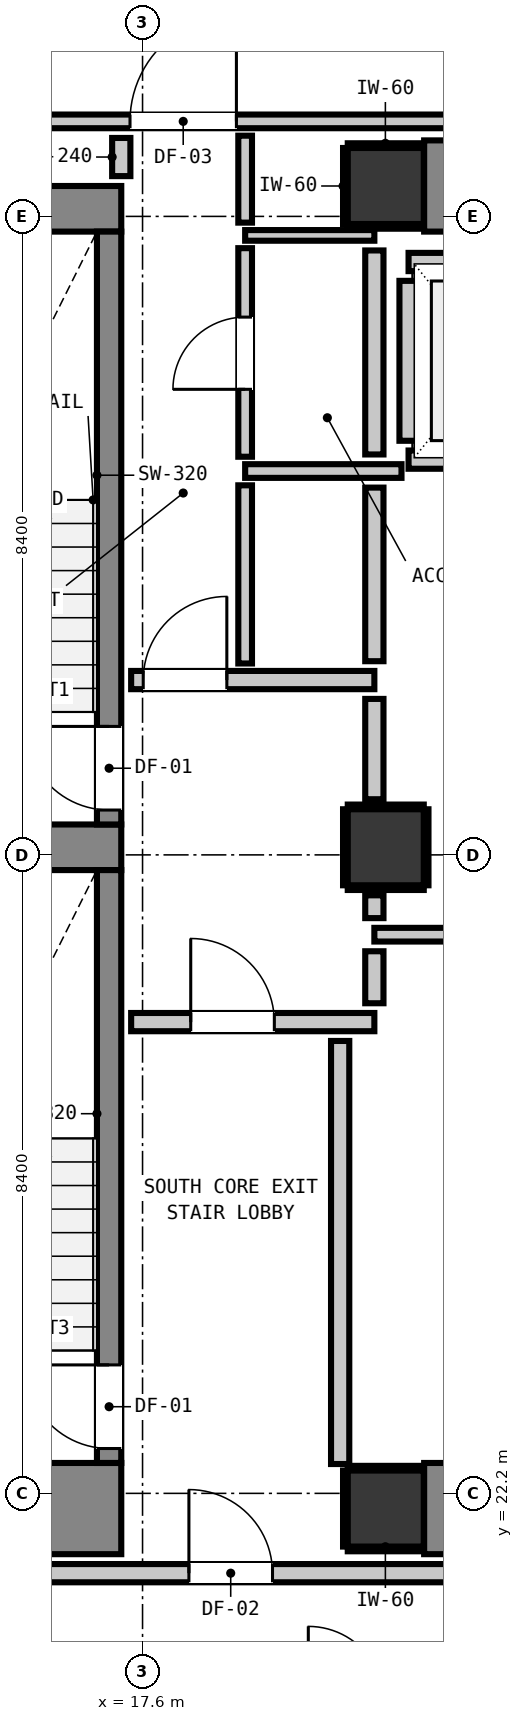
"""IFC4 building model, lengths in metres.
Left out: names, types, materials, properties, quantities, classifications, styles, units other than length and angle.
Written with IfcOpenShell. Run it as: python <this file> out.ifc"""

import sys

from ifc_helpers import new_model, si_unit, direction, frame, frame_2d, origin, origin_2d, place, context, subcontext, project, spatial, rectangle, extrude, element, fill, save


model = new_model("IFC4")
c1 = context("Model", 3, precision=1e-05, world=origin(), true_north=direction((0.0, 1.0)))
c2 = subcontext(c1, "Body", "Model", "MODEL_VIEW")
j1 = project(units=[si_unit("LENGTHUNIT", "METRE"), si_unit("PLANEANGLEUNIT", "RADIAN")], contexts=[c1])
p1 = place(None, origin())
s1 = spatial("IfcSite", under=j1, at=p1, CompositionType="ELEMENT")
p2 = place(p1, origin())
s2 = spatial("IfcBuilding", under=s1, at=p2, CompositionType="ELEMENT")
p3 = place(p2, frame((0.0, 0.0, 81.76)))
s3 = spatial("IfcBuildingStorey", under=s2, at=p3, CompositionType="ELEMENT", Elevation=81.76)
for number, where, z_axis, x_axis in (
    (1, (20.8, 22.0, 0.0), (0.0, 0.0, 1.0), (1.0, 0.0, 0.0)),
    (2, (20.8, 39.4, 0.0), (0.0, 0.0, 1.0), (1.0, 0.0, 0.0)),
):
    element("IfcColumn", number, at=place(p3, frame(where, z_axis=z_axis, x_axis=x_axis)), inside=s3, PredefinedType="COLUMN", context=c2, shape_type="SweptSolid", body=[
        extrude(rectangle(XDim=1.0, YDim=1.0, at=origin_2d()), origin(), (0.0, 0.0, 1.0), 3.32),
    ])
p4 = place(p3, frame((13.24, 22.0, 0.0), z_axis=(0.0, 0.0, 1.0), x_axis=(1.0, 0.0, 0.0)))
e3 = element("IfcWall", 3, at=p4, inside=s3, PredefinedType="SHEAR", context=c2, shape_type="SweptSolid", body=[
    extrude(rectangle(XDim=4.08, YDim=1.2, at=frame_2d((2.04, 0.0))), origin(), (0.0, 0.0, 1.0), 3.32),
])
p5 = place(p3, frame((13.24, 39.1, 0.0), z_axis=(0.0, 0.0, 1.0), x_axis=(1.0, 0.0, 0.0)))
e4 = element("IfcWall", 4, at=p5, inside=s3, PredefinedType="SHEAR", context=c2, shape_type="SweptSolid", body=[
    extrude(rectangle(XDim=4.08, YDim=0.6, at=frame_2d((2.04, 0.0))), origin(), (0.0, 0.0, 1.0), 3.32),
])
p6 = place(p3, frame((13.905, 30.7, 0.0), z_axis=(0.0, 0.0, 1.0), x_axis=(1.0, 0.0, 0.0)))
e5 = element("IfcWall", 5, at=p6, inside=s3, PredefinedType="SHEAR", context=c2, shape_type="SweptSolid", body=[
    extrude(rectangle(XDim=3.415, YDim=0.6, at=frame_2d((1.708, 0.0))), origin(), (0.0, 0.0, 1.0), 3.32),
])
for number, where, z_axis, x_axis in (
    (6, (21.305, 22.0, 0.0), (0.0, 0.0, 1.0), (1.0, 0.0, 0.0)),
    (7, (21.305, 39.4, 0.0), (0.0, 0.0, 1.0), (1.0, 0.0, 0.0)),
):
    element("IfcWall", number, at=place(p3, frame(where, z_axis=z_axis, x_axis=x_axis)), inside=s3, PredefinedType="SHEAR", context=c2, shape_type="SweptSolid", body=[
        extrude(rectangle(XDim=7.39, YDim=1.2, at=frame_2d((3.695, 0.0))), origin(), (0.0, 0.0, 1.0), 3.32),
    ])
p7 = place(p3, frame((17.16, 31.0, 0.0), z_axis=(0.0, 0.0, 1.0), x_axis=(0.0, 1.0, 0.0)))
e8 = element("IfcWall", 8, at=p7, inside=s3, PredefinedType="SHEAR", context=c2, shape_type="SweptSolid", body=[
    extrude(rectangle(XDim=7.8, YDim=0.32, at=frame_2d((3.9, 0.0))), origin(), (0.0, 0.0, 1.0), 3.32),
])
p8 = place(p7, frame((0.19, 0.0, 0.0)))
e9 = element("IfcOpeningElement", 9, at=p8, cuts=e8, PredefinedType="OPENING", context=c2, shape_type="SweptSolid", body=[
    extrude(rectangle(XDim=1.1, YDim=2.15, at=frame_2d((0.55, 1.075))), frame((0.0, 0.17, 0.0), z_axis=(0.0, -1.0, 0.0), x_axis=(1.0, 0.0, 0.0)), (0.0, 0.0, 1.0), 0.34),
])
p9 = place(p3, frame((17.16, 22.6, 0.0), z_axis=(0.0, 0.0, 1.0), x_axis=(0.0, 1.0, 0.0)))
e10 = element("IfcWall", 10, at=p9, inside=s3, PredefinedType="SHEAR", context=c2, shape_type="SweptSolid", body=[
    extrude(rectangle(XDim=7.8, YDim=0.32, at=frame_2d((3.9, 0.0))), origin(), (0.0, 0.0, 1.0), 3.32),
])
p10 = place(p9, frame((0.19, 0.0, 0.0)))
e11 = element("IfcOpeningElement", 11, at=p10, cuts=e10, PredefinedType="OPENING", context=c2, shape_type="SweptSolid", body=[
    extrude(rectangle(XDim=1.1, YDim=2.15, at=frame_2d((0.55, 1.075))), frame((0.0, 0.17, 0.0), z_axis=(0.0, -1.0, 0.0), x_axis=(1.0, 0.0, 0.0)), (0.0, 0.0, 1.0), 0.34),
])
p11 = place(p3, frame((20.8, 30.7, 0.0), z_axis=(0.0, 0.0, 1.0), x_axis=(1.0, 0.0, 0.0)))
e12 = element("IfcColumn", 12, at=p11, inside=s3, PredefinedType="COLUMN", context=c2, shape_type="SweptSolid", body=[
    extrude(rectangle(XDim=1.0, YDim=1.0, at=origin_2d()), origin(), (0.0, 0.0, 1.0), 3.32),
])
for number, where, z_axis, x_axis in (
    (13, (21.1, 35.8, 0.0), (0.0, 0.0, 1.0), (1.0, 0.0, 0.0)),
    (14, (21.1, 38.4, 0.0), (0.0, 0.0, 1.0), (1.0, 0.0, 0.0)),
):
    element("IfcWall", number, at=place(p3, frame(where, z_axis=z_axis, x_axis=x_axis)), inside=s3, PredefinedType="PARTITIONING", context=c2, shape_type="SweptSolid", body=[
        extrude(rectangle(XDim=2.2, YDim=0.24, at=frame_2d((1.1, 0.0))), origin(), (0.0, 0.0, 1.0), 3.06),
    ])
p12 = place(p3, frame((21.1, 36.048, 0.0), z_axis=(0.0, 0.0, 1.0), x_axis=(0.0, 1.0, 0.0)))
e15 = element("IfcWall", 15, at=p12, inside=s3, PredefinedType="PARTITIONING", context=c2, shape_type="SweptSolid", body=[
    extrude(rectangle(XDim=2.104, YDim=0.24, at=frame_2d((1.052, 0.0))), origin(), (0.0, 0.0, 1.0), 2.295),
])
p13 = place(p3, frame((12.993, 21.15, 0.0), z_axis=(0.0, 0.0, 1.0), x_axis=(1.0, 0.0, 0.0)))
e16 = element("IfcWall", 16, at=p13, inside=s3, PredefinedType="PARTITIONING", context=c2, shape_type="SweptSolid", body=[
    extrude(rectangle(XDim=30.98, YDim=0.24, at=frame_2d((15.49, 0.0))), origin(), (0.0, 0.0, 1.0), 3.06),
])
p14 = place(p13, frame((5.217, 0.0, 0.0)))
e17 = element("IfcOpeningElement", 17, at=p14, cuts=e16, PredefinedType="OPENING", context=c2, shape_type="SweptSolid", body=[
    extrude(rectangle(XDim=1.1, YDim=2.15, at=frame_2d((0.55, 1.075))), frame((0.0, 0.13, 0.0), z_axis=(0.0, -1.0, 0.0), x_axis=(1.0, 0.0, 0.0)), (0.0, 0.0, 1.0), 0.26),
])
p15 = place(p13, frame((27.358, 0.0, 0.0)))
e18 = element("IfcOpeningElement", 18, at=p15, cuts=e16, PredefinedType="OPENING", context=c2, shape_type="SweptSolid", body=[
    extrude(rectangle(XDim=1.0, YDim=2.15, at=frame_2d((0.5, 1.075))), frame((0.0, 0.13, 0.0), z_axis=(0.0, -1.0, 0.0), x_axis=(1.0, 0.0, 0.0)), (0.0, 0.0, 1.0), 0.26),
])
p16 = place(p3, frame((17.45, 28.4, 0.0), z_axis=(0.0, 0.0, 1.0), x_axis=(1.0, 0.0, 0.0)))
e19 = element("IfcWall", 19, at=p16, inside=s3, PredefinedType="PARTITIONING", context=c2, shape_type="SweptSolid", body=[
    extrude(rectangle(XDim=3.2, YDim=0.24, at=frame_2d((1.6, 0.0))), origin(), (0.0, 0.0, 1.0), 3.06),
])
p17 = place(p16, frame((0.784, 0.0, 0.0)))
e20 = element("IfcOpeningElement", 20, at=p17, cuts=e19, PredefinedType="OPENING", context=c2, shape_type="SweptSolid", body=[
    extrude(rectangle(XDim=1.1, YDim=2.15, at=frame_2d((0.55, 1.075))), frame((0.0, 0.13, 0.0), z_axis=(0.0, -1.0, 0.0), x_axis=(1.0, 0.0, 0.0)), (0.0, 0.0, 1.0), 0.26),
])
p18 = place(p3, frame((17.45, 32.9, 0.0), z_axis=(0.0, 0.0, 1.0), x_axis=(1.0, 0.0, 0.0)))
e21 = element("IfcWall", 21, at=p18, inside=s3, PredefinedType="PARTITIONING", context=c2, shape_type="SweptSolid", body=[
    extrude(rectangle(XDim=3.2, YDim=0.24, at=frame_2d((1.6, 0.0))), origin(), (0.0, 0.0, 1.0), 3.06),
])
p19 = place(p18, frame((0.159, 0.0, 0.0)))
e22 = element("IfcOpeningElement", 22, at=p19, cuts=e21, PredefinedType="OPENING", context=c2, shape_type="SweptSolid", body=[
    extrude(rectangle(XDim=1.1, YDim=2.15, at=frame_2d((0.55, 1.075))), frame((0.0, 0.13, 0.0), z_axis=(0.0, -1.0, 0.0), x_axis=(1.0, 0.0, 0.0)), (0.0, 0.0, 1.0), 0.26),
])
p20 = place(p3, frame((20.65, 29.55, 0.0), z_axis=(0.0, 0.0, 1.0), x_axis=(1.0, 0.0, 0.0)))
e23 = element("IfcWall", 23, at=p20, inside=s3, PredefinedType="PARTITIONING", context=c2, shape_type="SweptSolid", body=[
    extrude(rectangle(XDim=9.325, YDim=0.18, at=frame_2d((4.663, 0.0))), origin(), (0.0, 0.0, 1.0), 3.06),
])
p21 = place(p3, frame((18.95, 35.65, 0.0), z_axis=(0.0, 0.0, 1.0), x_axis=(1.0, 0.0, 0.0)))
e24 = element("IfcWall", 24, at=p21, inside=s3, PredefinedType="PARTITIONING", context=c2, shape_type="SweptSolid", body=[
    extrude(rectangle(XDim=2.057, YDim=0.18, at=frame_2d((1.029, 0.0))), origin(), (0.0, 0.0, 1.0), 3.06),
])
p22 = place(p3, frame((1.827, 40.25, 0.0), z_axis=(0.0, 0.0, 1.0), x_axis=(1.0, 0.0, 0.0)))
e25 = element("IfcWall", 25, at=p22, inside=s3, PredefinedType="PARTITIONING", context=c2, shape_type="SweptSolid", body=[
    extrude(rectangle(XDim=42.146, YDim=0.18, at=frame_2d((21.073, 0.0))), origin(), (0.0, 0.0, 1.0), 3.06),
])
p23 = place(p22, frame((15.608, 0.0, 0.0)))
e26 = element("IfcOpeningElement", 26, at=p23, cuts=e25, PredefinedType="OPENING", context=c2, shape_type="SweptSolid", body=[
    extrude(rectangle(XDim=1.4, YDim=2.15, at=frame_2d((0.7, 1.075))), frame((0.0, 0.1, 0.0), z_axis=(0.0, -1.0, 0.0), x_axis=(1.0, 0.0, 0.0)), (0.0, 0.0, 1.0), 0.2),
])
p24 = place(p22, frame((8.647, 0.0, 0.0)))
e27 = element("IfcOpeningElement", 27, at=p24, cuts=e25, PredefinedType="OPENING", context=c2, shape_type="SweptSolid", body=[
    extrude(rectangle(XDim=1.4, YDim=2.15, at=frame_2d((0.7, 1.075))), frame((0.0, 0.1, 0.0), z_axis=(0.0, -1.0, 0.0), x_axis=(1.0, 0.0, 0.0)), (0.0, 0.0, 1.0), 0.2),
])
p25 = place(p22, frame((38.524, 0.0, 0.0)))
e28 = element("IfcOpeningElement", 28, at=p25, cuts=e25, PredefinedType="OPENING", context=c2, shape_type="SweptSolid", body=[
    extrude(rectangle(XDim=1.0, YDim=2.15, at=frame_2d((0.5, 1.075))), frame((0.0, 0.1, 0.0), z_axis=(0.0, -1.0, 0.0), x_axis=(1.0, 0.0, 0.0)), (0.0, 0.0, 1.0), 0.2),
])
p26 = place(p3, frame((18.95, 38.75, 0.0), z_axis=(0.0, 0.0, 1.0), x_axis=(1.0, 0.0, 0.0)))
e29 = element("IfcWall", 29, at=p26, inside=s3, PredefinedType="PARTITIONING", context=c2, shape_type="SweptSolid", body=[
    extrude(rectangle(XDim=1.7, YDim=0.14, at=frame_2d((0.85, 0.0))), origin(), (0.0, 0.0, 1.0), 3.06),
])
p27 = place(p3, frame((17.32, 39.53, 0.0), z_axis=(0.0, 0.0, 1.0), x_axis=(0.0, 1.0, 0.0)))
e30 = element("IfcWall", 30, at=p27, inside=s3, PredefinedType="PARTITIONING", context=c2, shape_type="SweptSolid", body=[
    extrude(rectangle(XDim=0.502, YDim=0.24, at=frame_2d((0.251, 0.0))), origin(), (0.0, 0.0, 1.0), 3.06),
])
p28 = place(p3, frame((20.2, 22.586, 0.0), z_axis=(0.0, 0.0, 1.0), x_axis=(0.0, 1.0, 0.0)))
e31 = element("IfcWall", 31, at=p28, inside=s3, PredefinedType="PARTITIONING", context=c2, shape_type="SweptSolid", body=[
    extrude(rectangle(XDim=5.566, YDim=0.24, at=frame_2d((2.783, 0.0))), origin(), (0.0, 0.0, 1.0), 3.06),
])
p29 = place(p3, frame((20.65, 28.648, 0.0), z_axis=(0.0, 0.0, 1.0), x_axis=(0.0, 1.0, 0.0)))
e32 = element("IfcWall", 32, at=p29, inside=s3, PredefinedType="PARTITIONING", context=c2, shape_type="SweptSolid", body=[
    extrude(rectangle(XDim=0.684, YDim=0.24, at=frame_2d((0.342, 0.0))), origin(), (0.0, 0.0, 1.0), 2.295),
])
p30 = place(p3, frame((20.65, 29.768, 0.0), z_axis=(0.0, 0.0, 1.0), x_axis=(0.0, 1.0, 0.0)))
e33 = element("IfcWall", 33, at=p30, inside=s3, PredefinedType="PARTITIONING", context=c2, shape_type="SweptSolid", body=[
    extrude(rectangle(XDim=0.3, YDim=0.24, at=frame_2d((0.15, 0.0))), origin(), (0.0, 0.0, 1.0), 2.295),
])
p31 = place(p3, frame((20.65, 31.332, 0.0), z_axis=(0.0, 0.0, 1.0), x_axis=(0.0, 1.0, 0.0)))
e34 = element("IfcWall", 34, at=p31, inside=s3, PredefinedType="PARTITIONING", context=c2, shape_type="SweptSolid", body=[
    extrude(rectangle(XDim=1.32, YDim=0.24, at=frame_2d((0.66, 0.0))), origin(), (0.0, 0.0, 1.0), 2.295),
])
p32 = place(p3, frame((20.65, 33.148, 0.0), z_axis=(0.0, 0.0, 1.0), x_axis=(0.0, 1.0, 0.0)))
e35 = element("IfcWall", 35, at=p32, inside=s3, PredefinedType="PARTITIONING", context=c2, shape_type="SweptSolid", body=[
    extrude(rectangle(XDim=2.284, YDim=0.24, at=frame_2d((1.142, 0.0))), origin(), (0.0, 0.0, 1.0), 2.295),
])
p33 = place(p3, frame((20.65, 35.868, 0.0), z_axis=(0.0, 0.0, 1.0), x_axis=(0.0, 1.0, 0.0)))
e36 = element("IfcWall", 36, at=p33, inside=s3, PredefinedType="PARTITIONING", context=c2, shape_type="SweptSolid", body=[
    extrude(rectangle(XDim=2.684, YDim=0.24, at=frame_2d((1.342, 0.0))), origin(), (0.0, 0.0, 1.0), 2.295),
])
p34 = place(p3, frame((18.95, 33.118, 0.0), z_axis=(0.0, 0.0, 1.0), x_axis=(0.0, 1.0, 0.0)))
e37 = element("IfcWall", 37, at=p34, inside=s3, PredefinedType="PARTITIONING", context=c2, shape_type="SweptSolid", body=[
    extrude(rectangle(XDim=2.344, YDim=0.18, at=frame_2d((1.172, 0.0))), origin(), (0.0, 0.0, 1.0), 3.06),
])
p35 = place(p3, frame((18.95, 35.838, 0.0), z_axis=(0.0, 0.0, 1.0), x_axis=(0.0, 1.0, 0.0)))
e38 = element("IfcWall", 38, at=p35, inside=s3, PredefinedType="PARTITIONING", context=c2, shape_type="SweptSolid", body=[
    extrude(rectangle(XDim=2.744, YDim=0.18, at=frame_2d((1.372, 0.0))), origin(), (0.0, 0.0, 1.0), 3.06),
])
p36 = place(p35, frame((0.887, 0.0, 0.0)))
e39 = element("IfcOpeningElement", 39, at=p36, cuts=e38, PredefinedType="OPENING", context=c2, shape_type="SweptSolid", body=[
    extrude(rectangle(XDim=0.95, YDim=2.1, at=frame_2d((0.475, 1.05))), frame((0.0, 0.1, 0.0), z_axis=(0.0, -1.0, 0.0), x_axis=(1.0, 0.0, 0.0)), (0.0, 0.0, 1.0), 0.2),
])
p37 = place(p3, frame((18.95, 38.918, 0.0), z_axis=(0.0, 0.0, 1.0), x_axis=(0.0, 1.0, 0.0)))
e40 = element("IfcWall", 40, at=p37, inside=s3, PredefinedType="PARTITIONING", context=c2, shape_type="SweptSolid", body=[
    extrude(rectangle(XDim=1.144, YDim=0.18, at=frame_2d((0.572, 0.0))), origin(), (0.0, 0.0, 1.0), 3.06),
])
for number, where, z_axis, x_axis in (
    (41, (20.3, 21.468, 0.0), (0.0, 0.0, 1.0), (1.0, 0.0, 0.0)),
    (42, (20.3, 22.532, 0.0), (0.0, 0.0, 1.0), (1.0, 0.0, 0.0)),
):
    element("IfcWall", number, at=place(p3, frame(where, z_axis=z_axis, x_axis=x_axis)), inside=s3, PredefinedType="PARTITIONING", context=c2, shape_type="SweptSolid", body=[
        extrude(rectangle(XDim=0.99, YDim=0.06, at=frame_2d((0.495, 0.0))), origin(), (0.0, 0.0, 1.0), 1.45),
    ])
p38 = place(p3, frame((20.268, 21.5, 0.0), z_axis=(0.0, 0.0, 1.0), x_axis=(0.0, 1.0, 0.0)))
e43 = element("IfcWall", 43, at=p38, inside=s3, PredefinedType="PARTITIONING", context=c2, shape_type="SweptSolid", body=[
    extrude(rectangle(XDim=1.0, YDim=0.06, at=frame_2d((0.5, 0.0))), origin(), (0.0, 0.0, 1.0), 1.45),
])
for number, where, z_axis, x_axis in (
    (44, (20.3, 38.868, 0.0), (0.0, 0.0, 1.0), (1.0, 0.0, 0.0)),
    (45, (20.3, 39.932, 0.0), (0.0, 0.0, 1.0), (1.0, 0.0, 0.0)),
):
    element("IfcWall", number, at=place(p3, frame(where, z_axis=z_axis, x_axis=x_axis)), inside=s3, PredefinedType="PARTITIONING", context=c2, shape_type="SweptSolid", body=[
        extrude(rectangle(XDim=0.99, YDim=0.06, at=frame_2d((0.495, 0.0))), origin(), (0.0, 0.0, 1.0), 1.45),
    ])
for number, where, z_axis, x_axis in (
    (46, (20.268, 38.9, 0.0), (0.0, 0.0, 1.0), (0.0, 1.0, 0.0)),
    (47, (20.3, 30.168, 0.0), (0.0, 0.0, 1.0), (1.0, 0.0, 0.0)),
    (48, (20.3, 31.232, 0.0), (0.0, 0.0, 1.0), (1.0, 0.0, 0.0)),
    (49, (20.268, 30.2, 0.0), (0.0, 0.0, 1.0), (0.0, 1.0, 0.0)),
    (50, (21.332, 30.2, 0.0), (0.0, 0.0, 1.0), (0.0, 1.0, 0.0)),
):
    element("IfcWall", number, at=place(p3, frame(where, z_axis=z_axis, x_axis=x_axis)), inside=s3, PredefinedType="PARTITIONING", context=c2, shape_type="SweptSolid", body=[
        extrude(rectangle(XDim=1.0, YDim=0.06, at=frame_2d((0.5, 0.0))), origin(), (0.0, 0.0, 1.0), 1.45),
    ])
p39 = place(p8, origin())
e51 = element("IfcDoor", 51, at=p39, inside=s3, OperationType="SINGLE_SWING_RIGHT", PredefinedType="DOOR", context=c2, shape_type="SweptSolid", body=[
    extrude(rectangle(XDim=1.1, YDim=2.15, at=frame_2d((0.55, 1.075))), frame((0.0, 0.025, 0.0), z_axis=(0.0, -1.0, 0.0), x_axis=(1.0, 0.0, 0.0)), (0.0, 0.0, 1.0), 0.05),
])
fill(e9, e51)
p40 = place(p10, origin())
e52 = element("IfcDoor", 52, at=p40, inside=s3, OperationType="SINGLE_SWING_RIGHT", PredefinedType="DOOR", context=c2, shape_type="SweptSolid", body=[
    extrude(rectangle(XDim=1.1, YDim=2.15, at=frame_2d((0.55, 1.075))), frame((0.0, 0.025, 0.0), z_axis=(0.0, -1.0, 0.0), x_axis=(1.0, 0.0, 0.0)), (0.0, 0.0, 1.0), 0.05),
])
fill(e11, e52)
p41 = place(p17, origin())
e53 = element("IfcDoor", 53, at=p41, inside=s3, OperationType="SINGLE_SWING_LEFT", PredefinedType="DOOR", context=c2, shape_type="SweptSolid", body=[
    extrude(rectangle(XDim=1.1, YDim=2.15, at=frame_2d((0.55, 1.075))), frame((0.0, 0.025, 0.0), z_axis=(0.0, -1.0, 0.0), x_axis=(1.0, 0.0, 0.0)), (0.0, 0.0, 1.0), 0.05),
])
fill(e20, e53)
p42 = place(p19, origin())
e54 = element("IfcDoor", 54, at=p42, inside=s3, OperationType="SINGLE_SWING_RIGHT", PredefinedType="DOOR", context=c2, shape_type="SweptSolid", body=[
    extrude(rectangle(XDim=1.1, YDim=2.15, at=frame_2d((0.55, 1.075))), frame((0.0, 0.025, 0.0), z_axis=(0.0, -1.0, 0.0), x_axis=(1.0, 0.0, 0.0)), (0.0, 0.0, 1.0), 0.05),
])
fill(e22, e54)
p43 = place(p14, origin())
e55 = element("IfcDoor", 55, at=p43, inside=s3, OperationType="SINGLE_SWING_LEFT", PredefinedType="DOOR", context=c2, shape_type="SweptSolid", body=[
    extrude(rectangle(XDim=1.1, YDim=2.15, at=frame_2d((0.55, 1.075))), frame((0.0, 0.025, 0.0), z_axis=(0.0, -1.0, 0.0), x_axis=(1.0, 0.0, 0.0)), (0.0, 0.0, 1.0), 0.05),
])
fill(e17, e55)
p44 = place(p23, origin())
e56 = element("IfcDoor", 56, at=p44, inside=s3, OperationType="SINGLE_SWING_RIGHT", PredefinedType="DOOR", context=c2, shape_type="SweptSolid", body=[
    extrude(rectangle(XDim=1.4, YDim=2.15, at=frame_2d((0.7, 1.075))), frame((0.0, 0.025, 0.0), z_axis=(0.0, -1.0, 0.0), x_axis=(1.0, 0.0, 0.0)), (0.0, 0.0, 1.0), 0.05),
])
fill(e26, e56)
p45 = place(p36, origin())
e57 = element("IfcDoor", 57, at=p45, inside=s3, OperationType="SINGLE_SWING_LEFT", PredefinedType="DOOR", context=c2, shape_type="SweptSolid", body=[
    extrude(rectangle(XDim=0.95, YDim=2.1, at=frame_2d((0.475, 1.05))), frame((0.0, 0.025, 0.0), z_axis=(0.0, -1.0, 0.0), x_axis=(1.0, 0.0, 0.0)), (0.0, 0.0, 1.0), 0.05),
])
fill(e39, e57)
save(model, sys.argv[1])
